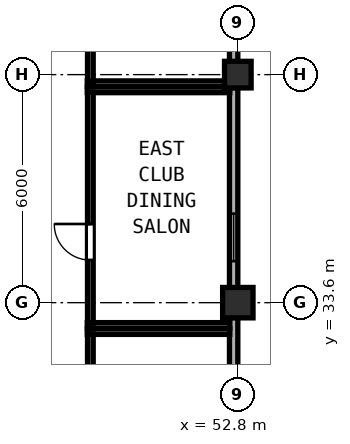
"""IFC4 building model, lengths in metres.
Left out: names, types, materials, properties, quantities, classifications, styles, units other than length and angle.
Written with IfcOpenShell. Run it as: python <this file> out.ifc"""

import sys

from ifc_helpers import new_model, si_unit, direction, frame, frame_2d, origin, origin_2d, place, context, subcontext, project, spatial, rectangle, hollow_rectangle, extrude, element, fill, save


model = new_model("IFC4")
c1 = context("Model", 3, precision=1e-05, world=origin(), true_north=direction((0.0, 1.0)))
c2 = subcontext(c1, "Body", "Model", "MODEL_VIEW")
j1 = project(units=[si_unit("LENGTHUNIT", "METRE"), si_unit("PLANEANGLEUNIT", "RADIAN")], contexts=[c1])
p1 = place(None, origin())
s1 = spatial("IfcSite", under=j1, at=p1, CompositionType="ELEMENT")
p2 = place(p1, origin())
s2 = spatial("IfcBuilding", under=s1, at=p2, CompositionType="ELEMENT")
p3 = place(p2, frame((0.0, 0.0, 246.75)))
s3 = spatial("IfcBuildingStorey", under=s2, at=p3, CompositionType="ELEMENT", Elevation=246.75)
p4 = place(p3, frame((52.8, 33.6, 0.0), z_axis=(0.0, 0.0, 1.0), x_axis=(1.0, 0.0, 0.0)))
e1 = element("IfcColumn", 1, at=p4, inside=s3, PredefinedType="COLUMN", context=c2, shape_type="SweptSolid", body=[
    extrude(hollow_rectangle(XDim=0.8, YDim=0.8, WallThickness=0.03, at=origin_2d()), origin(), (0.0, 0.0, 1.0), 3.85),
])
p5 = place(p3, frame((52.8, 39.6, 0.0), z_axis=(0.0, 0.0, 1.0), x_axis=(1.0, 0.0, 0.0)))
e2 = element("IfcColumn", 2, at=p5, inside=s3, PredefinedType="COLUMN", context=c2, shape_type="SweptSolid", body=[
    extrude(hollow_rectangle(XDim=0.7, YDim=0.7, WallThickness=0.026, at=origin_2d()), origin(), (0.0, 0.0, 1.0), 3.85),
])
p6 = place(p3, frame((52.69, 27.942, 0.0), z_axis=(0.0, 0.0, 1.0), x_axis=(0.0, 1.0, 0.0)))
e3 = element("IfcWall", 3, at=p6, inside=s3, PredefinedType="SOLIDWALL", context=c2, shape_type="SweptSolid", body=[
    extrude(rectangle(XDim=5.266, YDim=0.22, at=frame_2d((2.633, 0.0))), origin(), (0.0, 0.0, 1.0), 3.315),
])
p7 = place(p6, frame((0.7, 0.0, 0.85)))
e4 = element("IfcOpeningElement", 4, at=p7, cuts=e3, PredefinedType="OPENING", context=c2, shape_type="SweptSolid", body=[
    extrude(rectangle(XDim=1.25, YDim=1.95, at=frame_2d((0.625, 0.975))), frame((0.0, 0.12, 0.0), z_axis=(0.0, -1.0, 0.0), x_axis=(1.0, 0.0, 0.0)), (0.0, 0.0, 1.0), 0.24),
])
p8 = place(p3, frame((52.69, 33.992, 0.0), z_axis=(0.0, 0.0, 1.0), x_axis=(0.0, 1.0, 0.0)))
e5 = element("IfcWall", 5, at=p8, inside=s3, PredefinedType="SOLIDWALL", context=c2, shape_type="SweptSolid", body=[
    extrude(rectangle(XDim=5.266, YDim=0.22, at=frame_2d((2.633, 0.0))), origin(), (0.0, 0.0, 1.0), 3.315),
])
p9 = place(p8, frame((0.7, 0.0, 0.85)))
e6 = element("IfcOpeningElement", 6, at=p9, cuts=e5, PredefinedType="OPENING", context=c2, shape_type="SweptSolid", body=[
    extrude(rectangle(XDim=1.25, YDim=1.95, at=frame_2d((0.625, 0.975))), frame((0.0, 0.12, 0.0), z_axis=(0.0, -1.0, 0.0), x_axis=(1.0, 0.0, 0.0)), (0.0, 0.0, 1.0), 0.24),
])
p10 = place(p3, frame((52.69, 39.942, 0.0), z_axis=(0.0, 0.0, 1.0), x_axis=(0.0, 1.0, 0.0)))
e7 = element("IfcWall", 7, at=p10, inside=s3, PredefinedType="SOLIDWALL", context=c2, shape_type="SweptSolid", body=[
    extrude(rectangle(XDim=5.266, YDim=0.22, at=frame_2d((2.633, 0.0))), origin(), (0.0, 0.0, 1.0), 3.315),
])
p11 = place(p10, frame((0.7, 0.0, 0.85)))
e8 = element("IfcOpeningElement", 8, at=p11, cuts=e7, PredefinedType="OPENING", context=c2, shape_type="SweptSolid", body=[
    extrude(rectangle(XDim=1.25, YDim=1.95, at=frame_2d((0.625, 0.975))), frame((0.0, 0.12, 0.0), z_axis=(0.0, -1.0, 0.0), x_axis=(1.0, 0.0, 0.0)), (0.0, 0.0, 1.0), 0.24),
])
for number, where, z_axis, x_axis in (
    (9, (48.84, 39.2, 0.0), (0.0, 0.0, 1.0), (1.0, 0.0, 0.0)),
    (10, (48.84, 33.0, 0.0), (0.0, 0.0, 1.0), (1.0, 0.0, 0.0)),
):
    element("IfcWall", number, at=place(p3, frame(where, z_axis=z_axis, x_axis=x_axis)), inside=s3, PredefinedType="PARTITIONING", context=c2, shape_type="SweptSolid", body=[
        extrude(rectangle(XDim=3.748, YDim=0.15, at=frame_2d((1.874, 0.0))), origin(), (0.0, 0.0, 1.0), 3.67),
    ])
p12 = place(p3, frame((48.92, 33.06, 0.0), z_axis=(0.0, 0.0, 1.0), x_axis=(0.0, 1.0, 0.0)))
e11 = element("IfcWall", 11, at=p12, inside=s3, PredefinedType="PARTITIONING", context=c2, shape_type="SweptSolid", body=[
    extrude(rectangle(XDim=6.08, YDim=0.15, at=frame_2d((3.04, 0.0))), origin(), (0.0, 0.0, 1.0), 3.67),
])
p13 = place(p12, frame((1.66, 0.0, 0.0)))
e12 = element("IfcOpeningElement", 12, at=p13, cuts=e11, PredefinedType="OPENING", context=c2, shape_type="SweptSolid", body=[
    extrude(rectangle(XDim=0.95, YDim=2.12, at=frame_2d((0.475, 1.06))), frame((0.0, 0.085, 0.0), z_axis=(0.0, -1.0, 0.0), x_axis=(1.0, 0.0, 0.0)), (0.0, 0.0, 1.0), 0.17),
])
p14 = place(p3, frame((48.84, 39.36, 0.0), z_axis=(0.0, 0.0, 1.0), x_axis=(1.0, 0.0, 0.0)))
e13 = element("IfcWall", 13, at=p14, inside=s3, PredefinedType="PARTITIONING", context=c2, shape_type="SweptSolid", body=[
    extrude(rectangle(XDim=3.748, YDim=0.15, at=frame_2d((1.874, 0.0))), origin(), (0.0, 0.0, 1.0), 3.67),
])
p15 = place(p3, frame((48.92, 39.42, 0.0), z_axis=(0.0, 0.0, 1.0), x_axis=(0.0, 1.0, 0.0)))
e14 = element("IfcWall", 14, at=p15, inside=s3, PredefinedType="PARTITIONING", context=c2, shape_type="SweptSolid", body=[
    extrude(rectangle(XDim=6.54, YDim=0.15, at=frame_2d((3.27, 0.0))), origin(), (0.0, 0.0, 1.0), 3.67),
])
p16 = place(p15, frame((1.86, 0.0, 0.0)))
e15 = element("IfcOpeningElement", 15, at=p16, cuts=e14, PredefinedType="OPENING", context=c2, shape_type="SweptSolid", body=[
    extrude(rectangle(XDim=0.95, YDim=2.12, at=frame_2d((0.475, 1.06))), frame((0.0, 0.085, 0.0), z_axis=(0.0, -1.0, 0.0), x_axis=(1.0, 0.0, 0.0)), (0.0, 0.0, 1.0), 0.17),
])
p17 = place(p3, frame((48.84, 32.84, 0.0), z_axis=(0.0, 0.0, 1.0), x_axis=(1.0, 0.0, 0.0)))
e16 = element("IfcWall", 16, at=p17, inside=s3, PredefinedType="PARTITIONING", context=c2, shape_type="SweptSolid", body=[
    extrude(rectangle(XDim=3.748, YDim=0.15, at=frame_2d((1.874, 0.0))), origin(), (0.0, 0.0, 1.0), 3.67),
])
p18 = place(p3, frame((48.92, 26.41, 0.0), z_axis=(0.0, 0.0, 1.0), x_axis=(0.0, 1.0, 0.0)))
e17 = element("IfcWall", 17, at=p18, inside=s3, PredefinedType="PARTITIONING", context=c2, shape_type="SweptSolid", body=[
    extrude(rectangle(XDim=6.37, YDim=0.15, at=frame_2d((3.185, 0.0))), origin(), (0.0, 0.0, 1.0), 3.67),
])
p19 = place(p18, frame((0.86, 0.0, 0.0)))
e18 = element("IfcOpeningElement", 18, at=p19, cuts=e17, PredefinedType="OPENING", context=c2, shape_type="SweptSolid", body=[
    extrude(rectangle(XDim=0.95, YDim=2.12, at=frame_2d((0.475, 1.06))), frame((0.0, 0.085, 0.0), z_axis=(0.0, -1.0, 0.0), x_axis=(1.0, 0.0, 0.0)), (0.0, 0.0, 1.0), 0.17),
])
p20 = place(p9, origin())
e19 = element("IfcWindow", 19, at=p20, inside=s3, PartitioningType="SINGLE_PANEL", PredefinedType="WINDOW", context=c2, shape_type="SweptSolid", body=[
    extrude(rectangle(XDim=1.25, YDim=1.95, at=frame_2d((0.625, 0.975))), frame((0.0, 0.03, 0.0), z_axis=(0.0, -1.0, 0.0), x_axis=(1.0, 0.0, 0.0)), (0.0, 0.0, 1.0), 0.06),
])
fill(e6, e19)
p21 = place(p13, origin())
e20 = element("IfcDoor", 20, at=p21, inside=s3, OperationType="SINGLE_SWING_RIGHT", PredefinedType="DOOR", context=c2, shape_type="SweptSolid", body=[
    extrude(rectangle(XDim=0.95, YDim=2.12, at=frame_2d((0.475, 1.06))), frame((0.0, 0.025, 0.0), z_axis=(0.0, -1.0, 0.0), x_axis=(1.0, 0.0, 0.0)), (0.0, 0.0, 1.0), 0.05),
])
fill(e12, e20)
save(model, sys.argv[1])
